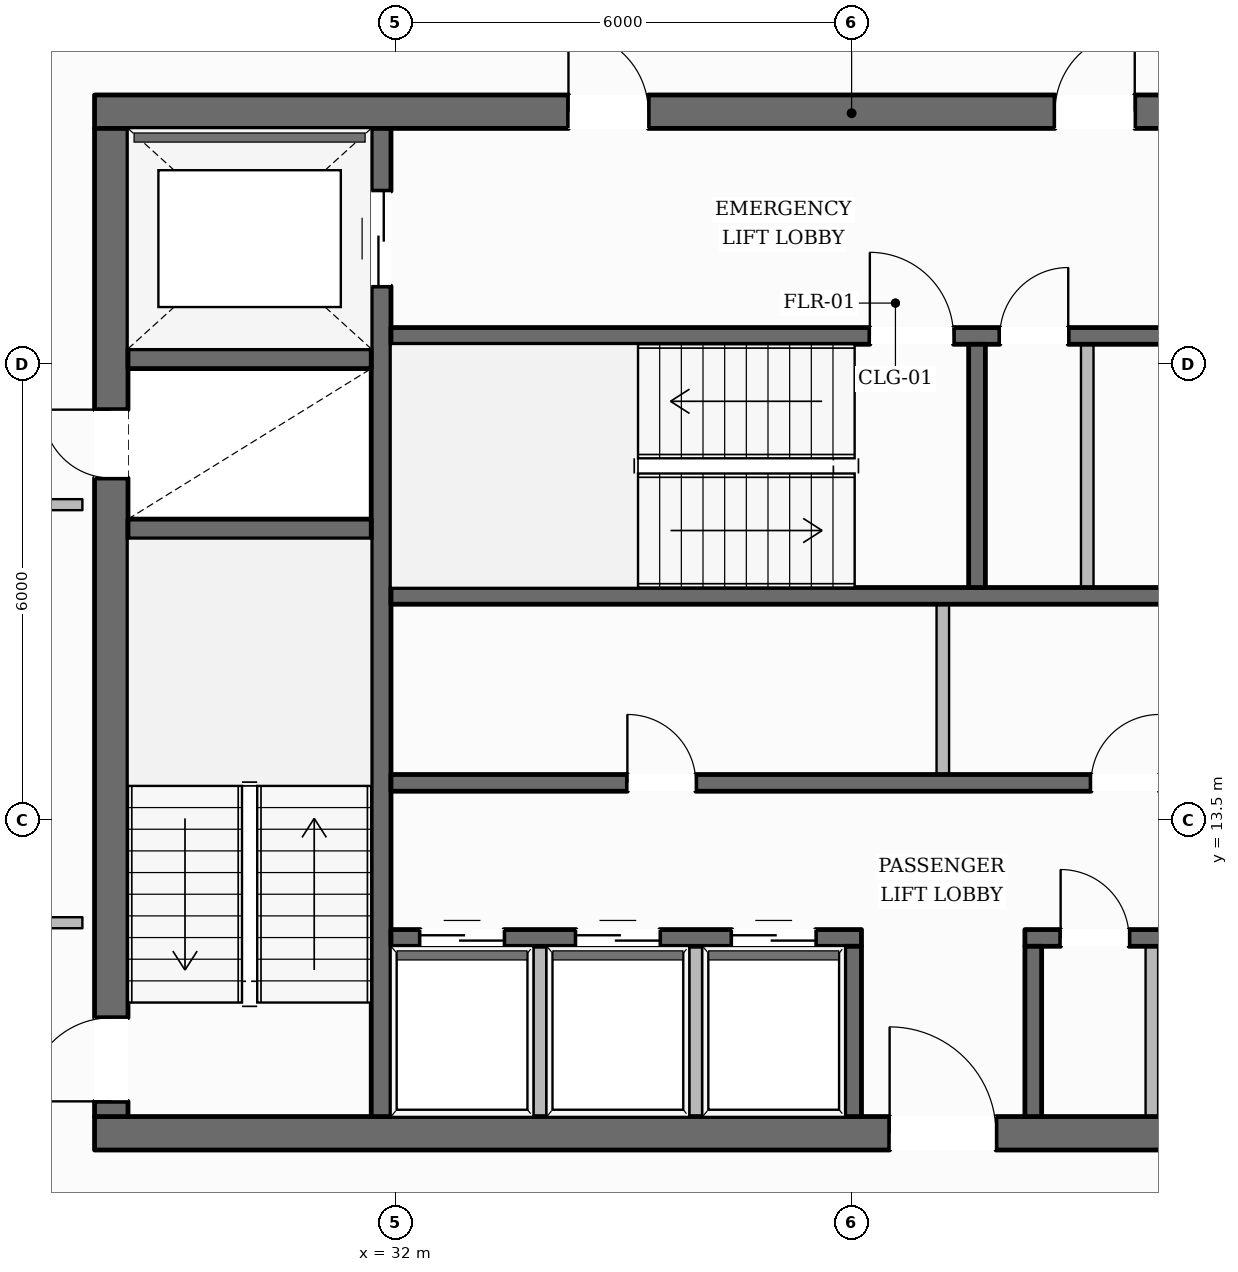
"""IFC4 building model, lengths in metres.
Left out: names, types, materials, properties, quantities, classifications, styles, units other than length and angle.
Written with IfcOpenShell. Run it as: python <this file> out.ifc"""

import sys

from ifc_helpers import new_model, si_unit, direction, frame, frame_2d, origin, place, context, subcontext, project, spatial, rectangle, extrude, element, fill, save


model = new_model("IFC4")
c1 = context("Model", 3, precision=1e-05, world=origin(), true_north=direction((0.0, 1.0)))
c2 = subcontext(c1, "Body", "Model", "MODEL_VIEW")
j1 = project(units=[si_unit("LENGTHUNIT", "METRE"), si_unit("PLANEANGLEUNIT", "RADIAN")], contexts=[c1])
p1 = place(None, origin())
s1 = spatial("IfcSite", under=j1, at=p1, CompositionType="ELEMENT")
p2 = place(p1, origin())
s2 = spatial("IfcBuilding", under=s1, at=p2, CompositionType="ELEMENT")
p3 = place(p2, frame((0.0, 0.0, 176.55)))
s3 = spatial("IfcBuildingStorey", under=s2, at=p3, CompositionType="ELEMENT", Elevation=176.55)
p4 = place(p3, frame((28.04, 9.38, 0.0), z_axis=(0.0, 0.0, 1.0), x_axis=(1.0, 0.0, 0.0)))
e1 = element("IfcWall", 1, at=p4, inside=s3, PredefinedType="SOLIDWALL", context=c2, shape_type="SweptSolid", body=[
    extrude(rectangle(XDim=19.92, YDim=0.44, at=frame_2d((9.96, 0.0))), origin(), (0.0, 0.0, 1.0), 3.6),
])
p5 = place(p4, frame((10.46, 0.0, 0.0)))
e2 = element("IfcOpeningElement", 2, at=p5, cuts=e1, PredefinedType="OPENING", context=c2, shape_type="SweptSolid", body=[
    extrude(rectangle(XDim=1.4, YDim=2.2, at=frame_2d((0.7, 1.1))), frame((0.0, 0.23, 0.0), z_axis=(0.0, -1.0, 0.0), x_axis=(1.0, 0.0, 0.0)), (0.0, 0.0, 1.0), 0.46),
])
p6 = place(p3, frame((28.04, 22.82, 0.0), z_axis=(0.0, 0.0, 1.0), x_axis=(1.0, 0.0, 0.0)))
e3 = element("IfcWall", 3, at=p6, inside=s3, PredefinedType="SOLIDWALL", context=c2, shape_type="SweptSolid", body=[
    extrude(rectangle(XDim=19.92, YDim=0.44, at=frame_2d((9.96, 0.0))), origin(), (0.0, 0.0, 1.0), 3.6),
])
p7 = place(p6, frame((6.235, 0.0, 0.0)))
e4 = element("IfcOpeningElement", 4, at=p7, cuts=e3, PredefinedType="OPENING", context=c2, shape_type="SweptSolid", body=[
    extrude(rectangle(XDim=1.05, YDim=2.15, at=frame_2d((0.525, 1.075))), frame((0.0, 0.23, 0.0), z_axis=(0.0, -1.0, 0.0), x_axis=(1.0, 0.0, 0.0)), (0.0, 0.0, 1.0), 0.46),
])
p8 = place(p6, frame((12.635, 0.0, 0.0)))
e5 = element("IfcOpeningElement", 5, at=p8, cuts=e3, PredefinedType="OPENING", context=c2, shape_type="SweptSolid", body=[
    extrude(rectangle(XDim=1.05, YDim=2.15, at=frame_2d((0.525, 1.075))), frame((0.0, 0.23, 0.0), z_axis=(0.0, -1.0, 0.0), x_axis=(1.0, 0.0, 0.0)), (0.0, 0.0, 1.0), 0.46),
])
p9 = place(p3, frame((28.26, 9.6, 0.0), z_axis=(0.0, 0.0, 1.0), x_axis=(0.0, 1.0, 0.0)))
e6 = element("IfcWall", 6, at=p9, inside=s3, PredefinedType="SOLIDWALL", context=c2, shape_type="SweptSolid", body=[
    extrude(rectangle(XDim=13.0, YDim=0.44, at=frame_2d((6.5, 0.0))), origin(), (0.0, 0.0, 1.0), 3.6),
])
p10 = place(p9, frame((0.2, 0.0, 0.0)))
e7 = element("IfcOpeningElement", 7, at=p10, cuts=e6, PredefinedType="OPENING", context=c2, shape_type="SweptSolid", body=[
    extrude(rectangle(XDim=1.1, YDim=2.15, at=frame_2d((0.55, 1.075))), frame((0.0, 0.23, 0.0), z_axis=(0.0, -1.0, 0.0), x_axis=(1.0, 0.0, 0.0)), (0.0, 0.0, 1.0), 0.46),
])
p11 = place(p9, frame((8.4, 0.0, 0.0)))
e8 = element("IfcOpeningElement", 8, at=p11, cuts=e6, PredefinedType="OPENING", context=c2, shape_type="SweptSolid", body=[
    extrude(rectangle(XDim=0.9, YDim=2.1, at=frame_2d((0.45, 1.05))), frame((0.0, 0.23, 0.0), z_axis=(0.0, -1.0, 0.0), x_axis=(1.0, 0.0, 0.0)), (0.0, 0.0, 1.0), 0.46),
])
p12 = place(p3, frame((31.81, 9.6, 0.0), z_axis=(0.0, 0.0, 1.0), x_axis=(0.0, 1.0, 0.0)))
e9 = element("IfcWall", 9, at=p12, inside=s3, PredefinedType="SHEAR", context=c2, shape_type="SweptSolid", body=[
    extrude(rectangle(XDim=13.0, YDim=0.26, at=frame_2d((6.5, 0.0))), origin(), (0.0, 0.0, 1.0), 3.6),
])
p13 = place(p12, frame((10.925, 0.0, 0.0)))
e10 = element("IfcOpeningElement", 10, at=p13, cuts=e9, PredefinedType="OPENING", context=c2, shape_type="SweptSolid", body=[
    extrude(rectangle(XDim=1.25, YDim=2.25, at=frame_2d((0.625, 1.125))), frame((0.0, 0.14, 0.0), z_axis=(0.0, -1.0, 0.0), x_axis=(1.0, 0.0, 0.0)), (0.0, 0.0, 1.0), 0.28),
])
for number, where, z_axis, x_axis in (
    (11, (28.48, 17.33, 0.0), (0.0, 0.0, 1.0), (1.0, 0.0, 0.0)),
    (12, (28.48, 19.57, 0.0), (0.0, 0.0, 1.0), (1.0, 0.0, 0.0)),
):
    element("IfcWall", number, at=place(p3, frame(where, z_axis=z_axis, x_axis=x_axis)), inside=s3, PredefinedType="SHEAR", context=c2, shape_type="SweptSolid", body=[
        extrude(rectangle(XDim=3.2, YDim=0.26, at=frame_2d((1.6, 0.0))), origin(), (0.0, 0.0, 1.0), 3.6),
    ])
p14 = place(p3, frame((31.94, 19.87, 0.0), z_axis=(0.0, 0.0, 1.0), x_axis=(1.0, 0.0, 0.0)))
e13 = element("IfcWall", 13, at=p14, inside=s3, PredefinedType="SOLIDWALL", context=c2, shape_type="SweptSolid", body=[
    extrude(rectangle(XDim=12.12, YDim=0.22, at=frame_2d((6.06, 0.0))), origin(), (0.0, 0.0, 1.0), 3.6),
])
p15 = place(p14, frame((6.3, 0.0, 0.0)))
e14 = element("IfcOpeningElement", 14, at=p15, cuts=e13, PredefinedType="OPENING", context=c2, shape_type="SweptSolid", body=[
    extrude(rectangle(XDim=1.1, YDim=2.15, at=frame_2d((0.55, 1.075))), frame((0.0, 0.12, 0.0), z_axis=(0.0, -1.0, 0.0), x_axis=(1.0, 0.0, 0.0)), (0.0, 0.0, 1.0), 0.24),
])
p16 = place(p14, frame((8.01, 0.0, 0.0)))
e15 = element("IfcOpeningElement", 15, at=p16, cuts=e13, PredefinedType="OPENING", context=c2, shape_type="SweptSolid", body=[
    extrude(rectangle(XDim=0.9, YDim=2.1, at=frame_2d((0.45, 1.05))), frame((0.0, 0.12, 0.0), z_axis=(0.0, -1.0, 0.0), x_axis=(1.0, 0.0, 0.0)), (0.0, 0.0, 1.0), 0.24),
])
p17 = place(p14, frame((10.21, 0.0, 0.0)))
e16 = element("IfcOpeningElement", 16, at=p17, cuts=e13, PredefinedType="OPENING", context=c2, shape_type="SweptSolid", body=[
    extrude(rectangle(XDim=0.9, YDim=2.1, at=frame_2d((0.45, 1.05))), frame((0.0, 0.12, 0.0), z_axis=(0.0, -1.0, 0.0), x_axis=(1.0, 0.0, 0.0)), (0.0, 0.0, 1.0), 0.24),
])
p18 = place(p3, frame((31.94, 16.45, 0.0), z_axis=(0.0, 0.0, 1.0), x_axis=(1.0, 0.0, 0.0)))
e17 = element("IfcWall", 17, at=p18, inside=s3, PredefinedType="SOLIDWALL", context=c2, shape_type="SweptSolid", body=[
    extrude(rectangle(XDim=12.12, YDim=0.22, at=frame_2d((6.06, 0.0))), origin(), (0.0, 0.0, 1.0), 3.6),
])
p19 = place(p3, frame((39.65, 16.56, 0.0), z_axis=(0.0, 0.0, 1.0), x_axis=(0.0, 1.0, 0.0)))
e18 = element("IfcWall", 18, at=p19, inside=s3, PredefinedType="SOLIDWALL", context=c2, shape_type="SweptSolid", body=[
    extrude(rectangle(XDim=3.2, YDim=0.22, at=frame_2d((1.6, 0.0))), origin(), (0.0, 0.0, 1.0), 3.6),
])
p20 = place(p3, frame((31.94, 13.99, 0.0), z_axis=(0.0, 0.0, 1.0), x_axis=(1.0, 0.0, 0.0)))
e19 = element("IfcWall", 19, at=p20, inside=s3, PredefinedType="SOLIDWALL", context=c2, shape_type="SweptSolid", body=[
    extrude(rectangle(XDim=12.12, YDim=0.22, at=frame_2d((6.06, 0.0))), origin(), (0.0, 0.0, 1.0), 3.6),
])
p21 = place(p20, frame((3.11, 0.0, 0.0)))
e20 = element("IfcOpeningElement", 20, at=p21, cuts=e19, PredefinedType="OPENING", context=c2, shape_type="SweptSolid", body=[
    extrude(rectangle(XDim=0.9, YDim=2.1, at=frame_2d((0.45, 1.05))), frame((0.0, 0.12, 0.0), z_axis=(0.0, -1.0, 0.0), x_axis=(1.0, 0.0, 0.0)), (0.0, 0.0, 1.0), 0.24),
])
p22 = place(p20, frame((9.21, 0.0, 0.0)))
e21 = element("IfcOpeningElement", 21, at=p22, cuts=e19, PredefinedType="OPENING", context=c2, shape_type="SweptSolid", body=[
    extrude(rectangle(XDim=0.9, YDim=2.1, at=frame_2d((0.45, 1.05))), frame((0.0, 0.12, 0.0), z_axis=(0.0, -1.0, 0.0), x_axis=(1.0, 0.0, 0.0)), (0.0, 0.0, 1.0), 0.24),
])
p23 = place(p3, frame((31.94, 11.95, 0.0), z_axis=(0.0, 0.0, 1.0), x_axis=(1.0, 0.0, 0.0)))
e22 = element("IfcWall", 22, at=p23, inside=s3, PredefinedType="SOLIDWALL", context=c2, shape_type="SweptSolid", body=[
    extrude(rectangle(XDim=6.19, YDim=0.22, at=frame_2d((3.095, 0.0))), origin(), (0.0, 0.0, 1.0), 3.6),
])
p24 = place(p23, frame((0.385, 0.0, 0.0)))
e23 = element("IfcOpeningElement", 23, at=p24, cuts=e22, PredefinedType="OPENING", context=c2, shape_type="SweptSolid", body=[
    extrude(rectangle(XDim=1.1, YDim=2.2, at=frame_2d((0.55, 1.1))), frame((0.0, 0.12, 0.0), z_axis=(0.0, -1.0, 0.0), x_axis=(1.0, 0.0, 0.0)), (0.0, 0.0, 1.0), 0.24),
])
p25 = place(p23, frame((2.435, 0.0, 0.0)))
e24 = element("IfcOpeningElement", 24, at=p25, cuts=e22, PredefinedType="OPENING", context=c2, shape_type="SweptSolid", body=[
    extrude(rectangle(XDim=1.1, YDim=2.2, at=frame_2d((0.55, 1.1))), frame((0.0, 0.12, 0.0), z_axis=(0.0, -1.0, 0.0), x_axis=(1.0, 0.0, 0.0)), (0.0, 0.0, 1.0), 0.24),
])
p26 = place(p23, frame((4.485, 0.0, 0.0)))
e25 = element("IfcOpeningElement", 25, at=p26, cuts=e22, PredefinedType="OPENING", context=c2, shape_type="SweptSolid", body=[
    extrude(rectangle(XDim=1.1, YDim=2.2, at=frame_2d((0.55, 1.1))), frame((0.0, 0.12, 0.0), z_axis=(0.0, -1.0, 0.0), x_axis=(1.0, 0.0, 0.0)), (0.0, 0.0, 1.0), 0.24),
])
p27 = place(p3, frame((40.28, 11.95, 0.0), z_axis=(0.0, 0.0, 1.0), x_axis=(1.0, 0.0, 0.0)))
e26 = element("IfcWall", 26, at=p27, inside=s3, PredefinedType="SOLIDWALL", context=c2, shape_type="SweptSolid", body=[
    extrude(rectangle(XDim=3.78, YDim=0.22, at=frame_2d((1.89, 0.0))), origin(), (0.0, 0.0, 1.0), 3.6),
])
p28 = place(p27, frame((0.47, 0.0, 0.0)))
e27 = element("IfcOpeningElement", 27, at=p28, cuts=e26, PredefinedType="OPENING", context=c2, shape_type="SweptSolid", body=[
    extrude(rectangle(XDim=0.9, YDim=2.1, at=frame_2d((0.45, 1.05))), frame((0.0, 0.12, 0.0), z_axis=(0.0, -1.0, 0.0), x_axis=(1.0, 0.0, 0.0)), (0.0, 0.0, 1.0), 0.24),
])
p29 = place(p27, frame((2.3, 0.0, 0.0)))
e28 = element("IfcOpeningElement", 28, at=p29, cuts=e26, PredefinedType="OPENING", context=c2, shape_type="SweptSolid", body=[
    extrude(rectangle(XDim=0.9, YDim=2.1, at=frame_2d((0.45, 1.05))), frame((0.0, 0.12, 0.0), z_axis=(0.0, -1.0, 0.0), x_axis=(1.0, 0.0, 0.0)), (0.0, 0.0, 1.0), 0.24),
])
for number, where, z_axis, x_axis in (
    (29, (38.02, 9.6, 0.0), (0.0, 0.0, 1.0), (0.0, 1.0, 0.0)),
    (30, (40.39, 9.6, 0.0), (0.0, 0.0, 1.0), (0.0, 1.0, 0.0)),
):
    element("IfcWall", number, at=place(p3, frame(where, z_axis=z_axis, x_axis=x_axis)), inside=s3, PredefinedType="SOLIDWALL", context=c2, shape_type="SweptSolid", body=[
        extrude(rectangle(XDim=2.24, YDim=0.22, at=frame_2d((1.12, 0.0))), origin(), (0.0, 0.0, 1.0), 3.6),
    ])
p30 = place(p3, frame((15.13, 12.109, 0.0), z_axis=(0.0, 0.0, 1.0), x_axis=(0.493717133856, 0.869622557054, 0.0)))
e31 = element("IfcWall", 31, at=p30, inside=s3, PredefinedType="STANDARD", context=c2, shape_type="SweptSolid", body=[
    extrude(rectangle(XDim=37.245, YDim=0.35, at=frame_2d((18.623, 0.0))), origin(), (0.0, 0.0, 1.0), 3.132),
])
p31 = place(p30, frame((27.334, 0.0, 0.0)))
e32 = element("IfcOpeningElement", 32, at=p31, cuts=e31, PredefinedType="OPENING", context=c2, shape_type="SweptSolid", body=[
    extrude(rectangle(XDim=1.0, YDim=2.2, at=frame_2d((0.5, 1.1))), frame((0.0, 0.185, 0.0), z_axis=(0.0, -1.0, 0.0), x_axis=(1.0, 0.0, 0.0)), (0.0, 0.0, 1.0), 0.37),
])
p32 = place(p30, frame((33.014, 0.0, 0.65)))
e33 = element("IfcOpeningElement", 33, at=p32, cuts=e31, PredefinedType="OPENING", context=c2, shape_type="SweptSolid", body=[
    extrude(rectangle(XDim=1.45, YDim=1.75, at=frame_2d((0.725, 0.875))), frame((0.0, 0.185, 0.0), z_axis=(0.0, -1.0, 0.0), x_axis=(1.0, 0.0, 0.0)), (0.0, 0.0, 1.0), 0.37),
])
p33 = place(p30, frame((20.918, 0.0, 0.65)))
e34 = element("IfcOpeningElement", 34, at=p33, cuts=e31, PredefinedType="OPENING", context=c2, shape_type="SweptSolid", body=[
    extrude(rectangle(XDim=1.45, YDim=1.75, at=frame_2d((0.725, 0.875))), frame((0.0, 0.185, 0.0), z_axis=(0.0, -1.0, 0.0), x_axis=(1.0, 0.0, 0.0)), (0.0, 0.0, 1.0), 0.37),
])
p34 = place(p30, frame((8.822, 0.0, 0.65)))
e35 = element("IfcOpeningElement", 35, at=p34, cuts=e31, PredefinedType="OPENING", context=c2, shape_type="SweptSolid", body=[
    extrude(rectangle(XDim=1.45, YDim=1.75, at=frame_2d((0.725, 0.875))), frame((0.0, 0.185, 0.0), z_axis=(0.0, -1.0, 0.0), x_axis=(1.0, 0.0, 0.0)), (0.0, 0.0, 1.0), 0.37),
])
p35 = place(p30, frame((2.774, 0.0, 0.65)))
e36 = element("IfcOpeningElement", 36, at=p35, cuts=e31, PredefinedType="OPENING", context=c2, shape_type="SweptSolid", body=[
    extrude(rectangle(XDim=1.45, YDim=1.75, at=frame_2d((0.725, 0.875))), frame((0.0, 0.185, 0.0), z_axis=(0.0, -1.0, 0.0), x_axis=(1.0, 0.0, 0.0)), (0.0, 0.0, 1.0), 0.37),
])
for number, where, z_axis, x_axis in (
    (37, (33.9, 9.52, 0.0), (0.0, 0.0, 1.0), (0.0, 1.0, 0.0)),
    (38, (35.95, 9.52, 0.0), (0.0, 0.0, 1.0), (0.0, 1.0, 0.0)),
):
    element("IfcWall", number, at=place(p3, frame(where, z_axis=z_axis, x_axis=x_axis)), inside=s3, PredefinedType="PARTITIONING", context=c2, shape_type="SweptSolid", body=[
        extrude(rectangle(XDim=2.32, YDim=0.165, at=frame_2d((1.16, 0.0))), origin(), (0.0, 0.0, 1.0), 3.6),
    ])
p36 = place(p3, frame((39.2, 14.1, 0.0), z_axis=(0.0, 0.0, 1.0), x_axis=(0.0, 1.0, 0.0)))
e39 = element("IfcWall", 39, at=p36, inside=s3, PredefinedType="PARTITIONING", context=c2, shape_type="SweptSolid", body=[
    extrude(rectangle(XDim=2.24, YDim=0.165, at=frame_2d((1.12, 0.0))), origin(), (0.0, 0.0, 1.0), 3.6),
])
p37 = place(p3, frame((41.1, 16.56, 0.0), z_axis=(0.0, 0.0, 1.0), x_axis=(0.0, 1.0, 0.0)))
e40 = element("IfcWall", 40, at=p37, inside=s3, PredefinedType="PARTITIONING", context=c2, shape_type="SweptSolid", body=[
    extrude(rectangle(XDim=3.2, YDim=0.165, at=frame_2d((1.6, 0.0))), origin(), (0.0, 0.0, 1.0), 3.6),
])
p38 = place(p3, frame((41.95, 9.52, 0.0), z_axis=(0.0, 0.0, 1.0), x_axis=(0.0, 1.0, 0.0)))
e41 = element("IfcWall", 41, at=p38, inside=s3, PredefinedType="PARTITIONING", context=c2, shape_type="SweptSolid", body=[
    extrude(rectangle(XDim=2.32, YDim=0.165, at=frame_2d((1.16, 0.0))), origin(), (0.0, 0.0, 1.0), 3.6),
])
p39 = place(p3, frame((27.88, 17.65, 0.0), z_axis=(0.0, 0.0, 1.0), x_axis=(-1.0, 0.0, 0.0)))
e42 = element("IfcWall", 42, at=p39, inside=s3, PredefinedType="PARTITIONING", context=c2, shape_type="SweptSolid", body=[
    extrude(rectangle(XDim=1.82, YDim=0.145, at=frame_2d((0.91, 0.0))), origin(), (0.0, 0.0, 1.0), 3.141),
])
p40 = place(p3, frame((26.06, 12.15, 0.0), z_axis=(0.0, 0.0, 1.0), x_axis=(1.0, 0.0, 0.0)))
e43 = element("IfcWall", 43, at=p40, inside=s3, PredefinedType="PARTITIONING", context=c2, shape_type="SweptSolid", body=[
    extrude(rectangle(XDim=1.82, YDim=0.145, at=frame_2d((0.91, 0.0))), origin(), (0.0, 0.0, 1.0), 3.6),
])
p41 = place(p10, origin())
e44 = element("IfcDoor", 44, at=p41, inside=s3, OperationType="SINGLE_SWING_LEFT", PredefinedType="DOOR", context=c2, shape_type="SweptSolid", body=[
    extrude(rectangle(XDim=1.1, YDim=2.15, at=frame_2d((0.55, 1.075))), frame((0.0, 0.025, 0.0), z_axis=(0.0, -1.0, 0.0), x_axis=(1.0, 0.0, 0.0)), (0.0, 0.0, 1.0), 0.05),
])
fill(e7, e44)
p42 = place(p15, origin())
e45 = element("IfcDoor", 45, at=p42, inside=s3, OperationType="SINGLE_SWING_LEFT", PredefinedType="DOOR", context=c2, shape_type="SweptSolid", body=[
    extrude(rectangle(XDim=1.1, YDim=2.15, at=frame_2d((0.55, 1.075))), frame((0.0, 0.025, 0.0), z_axis=(0.0, -1.0, 0.0), x_axis=(1.0, 0.0, 0.0)), (0.0, 0.0, 1.0), 0.05),
])
fill(e14, e45)
p43 = place(p11, origin())
e46 = element("IfcDoor", 46, at=p43, inside=s3, OperationType="SINGLE_SWING_RIGHT", PredefinedType="DOOR", context=c2, shape_type="SweptSolid", body=[
    extrude(rectangle(XDim=0.9, YDim=2.1, at=frame_2d((0.45, 1.05))), frame((0.0, 0.025, 0.0), z_axis=(0.0, -1.0, 0.0), x_axis=(1.0, 0.0, 0.0)), (0.0, 0.0, 1.0), 0.05),
])
fill(e8, e46)
p44 = place(p7, origin())
e47 = element("IfcDoor", 47, at=p44, inside=s3, OperationType="SINGLE_SWING_LEFT", PredefinedType="DOOR", context=c2, shape_type="SweptSolid", body=[
    extrude(rectangle(XDim=1.05, YDim=2.15, at=frame_2d((0.525, 1.075))), frame((0.0, 0.025, 0.0), z_axis=(0.0, -1.0, 0.0), x_axis=(1.0, 0.0, 0.0)), (0.0, 0.0, 1.0), 0.05),
])
fill(e4, e47)
p45 = place(p8, origin())
e48 = element("IfcDoor", 48, at=p45, inside=s3, OperationType="SINGLE_SWING_RIGHT", PredefinedType="DOOR", context=c2, shape_type="SweptSolid", body=[
    extrude(rectangle(XDim=1.05, YDim=2.15, at=frame_2d((0.525, 1.075))), frame((0.0, 0.025, 0.0), z_axis=(0.0, -1.0, 0.0), x_axis=(1.0, 0.0, 0.0)), (0.0, 0.0, 1.0), 0.05),
])
fill(e5, e48)
p46 = place(p13, origin())
e49 = element("IfcDoor", 49, at=p46, inside=s3, OperationType="DOUBLE_DOOR_SLIDING", PredefinedType="DOOR", context=c2, shape_type="SweptSolid", body=[
    extrude(rectangle(XDim=1.25, YDim=2.25, at=frame_2d((0.625, 1.125))), frame((0.0, 0.025, 0.0), z_axis=(0.0, -1.0, 0.0), x_axis=(1.0, 0.0, 0.0)), (0.0, 0.0, 1.0), 0.05),
])
fill(e10, e49)
p47 = place(p5, origin())
e50 = element("IfcDoor", 50, at=p47, inside=s3, OperationType="SINGLE_SWING_LEFT", PredefinedType="DOOR", context=c2, shape_type="SweptSolid", body=[
    extrude(rectangle(XDim=1.4, YDim=2.2, at=frame_2d((0.7, 1.1))), frame((0.0, 0.025, 0.0), z_axis=(0.0, -1.0, 0.0), x_axis=(1.0, 0.0, 0.0)), (0.0, 0.0, 1.0), 0.05),
])
fill(e2, e50)
p48 = place(p24, origin())
e51 = element("IfcDoor", 51, at=p48, inside=s3, OperationType="DOUBLE_DOOR_SLIDING", PredefinedType="DOOR", context=c2, shape_type="SweptSolid", body=[
    extrude(rectangle(XDim=1.1, YDim=2.2, at=frame_2d((0.55, 1.1))), frame((0.0, 0.025, 0.0), z_axis=(0.0, -1.0, 0.0), x_axis=(1.0, 0.0, 0.0)), (0.0, 0.0, 1.0), 0.05),
])
fill(e23, e51)
p49 = place(p25, origin())
e52 = element("IfcDoor", 52, at=p49, inside=s3, OperationType="DOUBLE_DOOR_SLIDING", PredefinedType="DOOR", context=c2, shape_type="SweptSolid", body=[
    extrude(rectangle(XDim=1.1, YDim=2.2, at=frame_2d((0.55, 1.1))), frame((0.0, 0.025, 0.0), z_axis=(0.0, -1.0, 0.0), x_axis=(1.0, 0.0, 0.0)), (0.0, 0.0, 1.0), 0.05),
])
fill(e24, e52)
p50 = place(p26, origin())
e53 = element("IfcDoor", 53, at=p50, inside=s3, OperationType="DOUBLE_DOOR_SLIDING", PredefinedType="DOOR", context=c2, shape_type="SweptSolid", body=[
    extrude(rectangle(XDim=1.1, YDim=2.2, at=frame_2d((0.55, 1.1))), frame((0.0, 0.025, 0.0), z_axis=(0.0, -1.0, 0.0), x_axis=(1.0, 0.0, 0.0)), (0.0, 0.0, 1.0), 0.05),
])
fill(e25, e53)
p51 = place(p21, origin())
e54 = element("IfcDoor", 54, at=p51, inside=s3, OperationType="SINGLE_SWING_LEFT", PredefinedType="DOOR", context=c2, shape_type="SweptSolid", body=[
    extrude(rectangle(XDim=0.9, YDim=2.1, at=frame_2d((0.45, 1.05))), frame((0.0, 0.025, 0.0), z_axis=(0.0, -1.0, 0.0), x_axis=(1.0, 0.0, 0.0)), (0.0, 0.0, 1.0), 0.05),
])
fill(e20, e54)
p52 = place(p22, origin())
e55 = element("IfcDoor", 55, at=p52, inside=s3, OperationType="SINGLE_SWING_RIGHT", PredefinedType="DOOR", context=c2, shape_type="SweptSolid", body=[
    extrude(rectangle(XDim=0.9, YDim=2.1, at=frame_2d((0.45, 1.05))), frame((0.0, 0.025, 0.0), z_axis=(0.0, -1.0, 0.0), x_axis=(1.0, 0.0, 0.0)), (0.0, 0.0, 1.0), 0.05),
])
fill(e21, e55)
p53 = place(p16, origin())
e56 = element("IfcDoor", 56, at=p53, inside=s3, OperationType="SINGLE_SWING_RIGHT", PredefinedType="DOOR", context=c2, shape_type="SweptSolid", body=[
    extrude(rectangle(XDim=0.9, YDim=2.1, at=frame_2d((0.45, 1.05))), frame((0.0, 0.025, 0.0), z_axis=(0.0, -1.0, 0.0), x_axis=(1.0, 0.0, 0.0)), (0.0, 0.0, 1.0), 0.05),
])
fill(e15, e56)
p54 = place(p28, origin())
e57 = element("IfcDoor", 57, at=p54, inside=s3, OperationType="SINGLE_SWING_LEFT", PredefinedType="DOOR", context=c2, shape_type="SweptSolid", body=[
    extrude(rectangle(XDim=0.9, YDim=2.1, at=frame_2d((0.45, 1.05))), frame((0.0, 0.025, 0.0), z_axis=(0.0, -1.0, 0.0), x_axis=(1.0, 0.0, 0.0)), (0.0, 0.0, 1.0), 0.05),
])
fill(e27, e57)
save(model, sys.argv[1])
